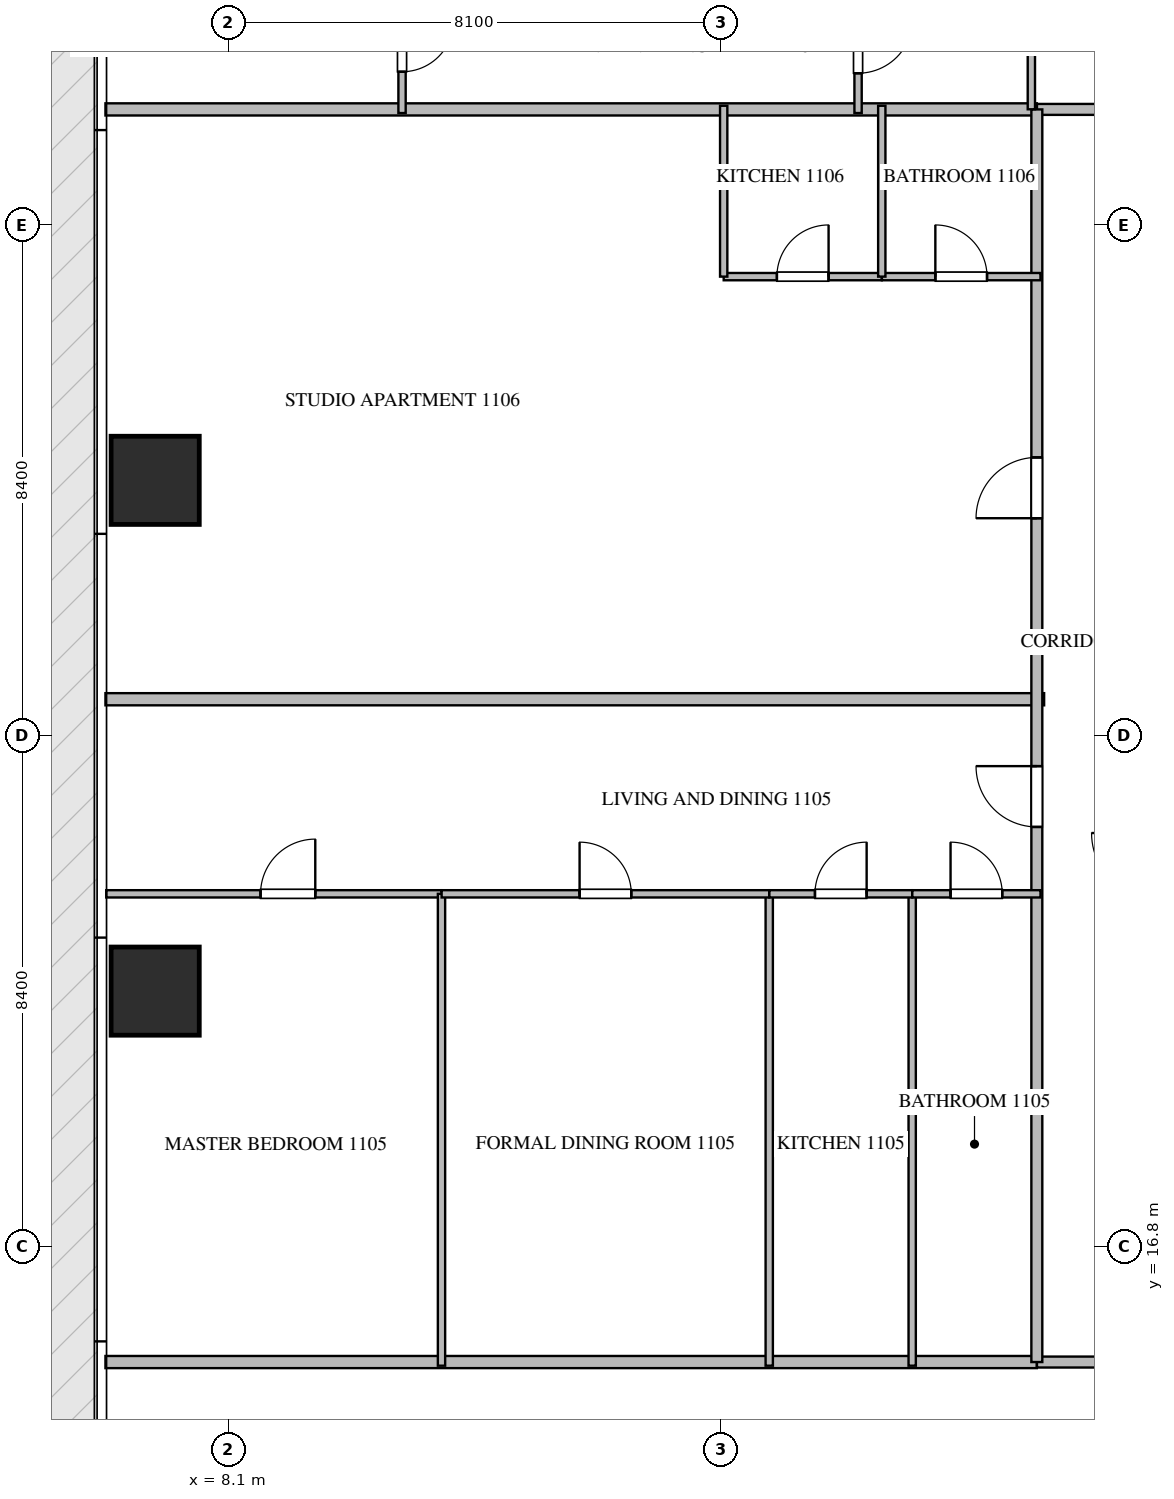
"""IFC4 building model, lengths in metres.
Left out: names, types, materials, properties, quantities, classifications, styles, units other than length and angle.
Written with IfcOpenShell. Run it as: python <this file> out.ifc"""

import sys

from ifc_helpers import new_model, si_unit, direction, frame, frame_2d, origin, origin_2d, place, context, subcontext, project, spatial, rectangle, extrude, source, transform, mapped, element, fill, save


model = new_model("IFC4")
c1 = context("Model", 3, precision=1e-05, world=origin(), true_north=direction((0.0, 1.0)))
c2 = subcontext(c1, "Body", "Model", "MODEL_VIEW")
j1 = project(units=[si_unit("LENGTHUNIT", "METRE"), si_unit("PLANEANGLEUNIT", "RADIAN")], contexts=[c1])
p1 = place(None, origin())
s1 = spatial("IfcSite", under=j1, at=p1, CompositionType="ELEMENT")
p2 = place(p1, origin())
s2 = spatial("IfcBuilding", under=s1, at=p2, CompositionType="ELEMENT")
p3 = place(p2, frame((0.0, 0.0, 49.2)))
s3 = spatial("IfcBuildingStorey", under=s2, at=p3, CompositionType="ELEMENT", Elevation=49.2)
m1 = source(origin(), c2, "Body", "SweptSolid", [
    extrude(rectangle(XDim=1.45, YDim=1.45, at=origin_2d()), origin(), (0.0, 0.0, 1.0), 3.75),
])
for number, where, z_axis, x_axis in (
    (1, (6.9, 21.0, -0.26), (0.0, 0.0, 1.0), (1.0, 0.0, 0.0)),
    (2, (6.9, 29.4, -0.26), (0.0, 0.0, 1.0), (1.0, 0.0, 0.0)),
):
    element("IfcColumn", number, at=place(p3, frame(where, z_axis=z_axis, x_axis=x_axis)), inside=s3, PredefinedType="COLUMN", context=c2, shape_type="MappedRepresentation", body=[
        mapped(m1, transform((0.0, 0.0, 0.0), scale=1.0)),
    ])
p4 = place(p3, frame((6.082, 25.8, 0.0), z_axis=(0.0, 0.0, 1.0), x_axis=(1.0, 0.0, 0.0)))
e3 = element("IfcWall", 3, at=p4, inside=s3, PredefinedType="PARTITIONING", context=c2, shape_type="SweptSolid", body=[
    extrude(rectangle(XDim=15.438, YDim=0.2, at=frame_2d((7.719, 0.0))), origin(), (0.0, 0.0, 1.0), 3.49),
])
for number, where, z_axis, x_axis in (
    (4, (6.082, 14.9, 0.0), (0.0, 0.0, 1.0), (1.0, 0.0, 0.0)),
    (5, (6.082, 35.5, 0.0), (0.0, 0.0, 1.0), (1.0, 0.0, 0.0)),
):
    element("IfcWall", number, at=place(p3, frame(where, z_axis=z_axis, x_axis=x_axis)), inside=s3, PredefinedType="PARTITIONING", context=c2, shape_type="SweptSolid", body=[
        extrude(rectangle(XDim=15.318, YDim=0.2, at=frame_2d((7.659, 0.0))), origin(), (0.0, 0.0, 1.0), 3.49),
    ])
p5 = place(p3, frame((21.402, 14.9, 0.0), z_axis=(0.0, 0.0, 1.0), x_axis=(1.0, 0.0, 0.0)))
e6 = element("IfcWall", 6, at=p5, inside=s3, PredefinedType="PARTITIONING", context=c2, shape_type="SweptSolid", body=[
    extrude(rectangle(XDim=21.996, YDim=0.18, at=frame_2d((10.998, 0.0))), origin(), (0.0, 0.0, 1.0), 3.49),
])
p6 = place(p5, frame((15.222, 0.0, 0.0)))
e7 = element("IfcOpeningElement", 7, at=p6, cuts=e6, PredefinedType="OPENING", context=c2, shape_type="SweptSolid", body=[
    extrude(rectangle(XDim=1.0, YDim=2.15, at=frame_2d((0.5, 1.075))), frame((0.0, 0.1, 0.0), z_axis=(0.0, -1.0, 0.0), x_axis=(1.0, 0.0, 0.0)), (0.0, 0.0, 1.0), 0.2),
])
p7 = place(p3, frame((21.402, 35.5, 0.0), z_axis=(0.0, 0.0, 1.0), x_axis=(1.0, 0.0, 0.0)))
e8 = element("IfcWall", 8, at=p7, inside=s3, PredefinedType="PARTITIONING", context=c2, shape_type="SweptSolid", body=[
    extrude(rectangle(XDim=21.996, YDim=0.18, at=frame_2d((10.998, 0.0))), origin(), (0.0, 0.0, 1.0), 3.49),
])
p8 = place(p7, frame((2.1, 0.0, 0.0)))
e9 = element("IfcOpeningElement", 9, at=p8, cuts=e8, PredefinedType="OPENING", context=c2, shape_type="SweptSolid", body=[
    extrude(rectangle(XDim=1.0, YDim=2.15, at=frame_2d((0.5, 1.075))), frame((0.0, 0.1, 0.0), z_axis=(0.0, -1.0, 0.0), x_axis=(1.0, 0.0, 0.0)), (0.0, 0.0, 1.0), 0.2),
])
p9 = place(p7, frame((14.214, 0.0, 0.0)))
e10 = element("IfcOpeningElement", 10, at=p9, cuts=e8, PredefinedType="OPENING", context=c2, shape_type="SweptSolid", body=[
    extrude(rectangle(XDim=1.0, YDim=2.15, at=frame_2d((0.5, 1.075))), frame((0.0, 0.1, 0.0), z_axis=(0.0, -1.0, 0.0), x_axis=(1.0, 0.0, 0.0)), (0.0, 0.0, 1.0), 0.2),
])
p10 = place(p7, frame((18.896, 0.0, 0.0)))
e11 = element("IfcOpeningElement", 11, at=p10, cuts=e8, PredefinedType="OPENING", context=c2, shape_type="SweptSolid", body=[
    extrude(rectangle(XDim=1.0, YDim=2.15, at=frame_2d((0.5, 1.075))), frame((0.0, 0.1, 0.0), z_axis=(0.0, -1.0, 0.0), x_axis=(1.0, 0.0, 0.0)), (0.0, 0.0, 1.0), 0.2),
])
p11 = place(p3, frame((21.4, 14.9, 0.0), z_axis=(0.0, 0.0, 1.0), x_axis=(0.0, 1.0, 0.0)))
e12 = element("IfcWall", 12, at=p11, inside=s3, PredefinedType="PARTITIONING", context=c2, shape_type="SweptSolid", body=[
    extrude(rectangle(XDim=20.6, YDim=0.18, at=frame_2d((10.3, 0.0))), origin(), (0.0, 0.0, 1.0), 3.49),
])
p12 = place(p11, frame((8.8, 0.0, 0.0)))
e13 = element("IfcOpeningElement", 13, at=p12, cuts=e12, PredefinedType="OPENING", context=c2, shape_type="SweptSolid", body=[
    extrude(rectangle(XDim=1.0, YDim=2.15, at=frame_2d((0.5, 1.075))), frame((0.0, 0.1, 0.0), z_axis=(0.0, -1.0, 0.0), x_axis=(1.0, 0.0, 0.0)), (0.0, 0.0, 1.0), 0.2),
])
p13 = place(p11, frame((13.877, 0.0, 0.0)))
e14 = element("IfcOpeningElement", 14, at=p13, cuts=e12, PredefinedType="OPENING", context=c2, shape_type="SweptSolid", body=[
    extrude(rectangle(XDim=1.0, YDim=2.15, at=frame_2d((0.5, 1.075))), frame((0.0, 0.1, 0.0), z_axis=(0.0, -1.0, 0.0), x_axis=(1.0, 0.0, 0.0)), (0.0, 0.0, 1.0), 0.2),
])
p14 = place(p3, frame((21.31, 38.25, 0.0), z_axis=(0.0, 0.0, 1.0), x_axis=(0.0, -1.0, 0.0)))
e15 = element("IfcWall", 15, at=p14, inside=s3, PredefinedType="PARTITIONING", context=c2, shape_type="SweptSolid", body=[
    extrude(rectangle(XDim=2.748, YDim=0.12, at=frame_2d((1.374, 0.0))), origin(), (0.0, 0.0, 1.0), 3.49),
])
p15 = place(p3, frame((18.46, 37.65, 0.0), z_axis=(0.0, 0.0, 1.0), x_axis=(0.0, -1.0, 0.0)))
e16 = element("IfcWall", 16, at=p15, inside=s3, PredefinedType="PARTITIONING", context=c2, shape_type="SweptSolid", body=[
    extrude(rectangle(XDim=2.21, YDim=0.12, at=frame_2d((1.105, 0.0))), origin(), (0.0, 0.0, 1.0), 3.49),
])
p16 = place(p15, frame((0.655, 0.0, 0.0)))
e17 = element("IfcOpeningElement", 17, at=p16, cuts=e16, PredefinedType="OPENING", context=c2, shape_type="SweptSolid", body=[
    extrude(rectangle(XDim=0.9, YDim=2.1, at=frame_2d((0.45, 1.05))), frame((0.0, 0.07, 0.0), z_axis=(0.0, -1.0, 0.0), x_axis=(1.0, 0.0, 0.0)), (0.0, 0.0, 1.0), 0.14),
])
p17 = place(p3, frame((10.96, 37.648, 0.0), z_axis=(0.0, 0.0, 1.0), x_axis=(0.0, -1.0, 0.0)))
e18 = element("IfcWall", 18, at=p17, inside=s3, PredefinedType="PARTITIONING", context=c2, shape_type="SweptSolid", body=[
    extrude(rectangle(XDim=2.208, YDim=0.12, at=frame_2d((1.104, 0.0))), origin(), (0.0, 0.0, 1.0), 3.49),
])
p18 = place(p17, frame((0.679, 0.0, 0.0)))
e19 = element("IfcOpeningElement", 19, at=p18, cuts=e18, PredefinedType="OPENING", context=c2, shape_type="SweptSolid", body=[
    extrude(rectangle(XDim=0.85, YDim=2.1, at=frame_2d((0.425, 1.05))), frame((0.0, 0.07, 0.0), z_axis=(0.0, -1.0, 0.0), x_axis=(1.0, 0.0, 0.0)), (0.0, 0.0, 1.0), 0.14),
])
p19 = place(p3, frame((6.095, 22.6, 0.0), z_axis=(0.0, 0.0, 1.0), x_axis=(1.0, 0.0, 0.0)))
e20 = element("IfcWall", 20, at=p19, inside=s3, PredefinedType="PARTITIONING", context=c2, shape_type="SweptSolid", body=[
    extrude(rectangle(XDim=5.514, YDim=0.12, at=frame_2d((2.757, 0.0))), origin(), (0.0, 0.0, 1.0), 3.49),
])
p20 = place(p19, frame((2.538, 0.0, 0.0)))
e21 = element("IfcOpeningElement", 21, at=p20, cuts=e20, PredefinedType="OPENING", context=c2, shape_type="SweptSolid", body=[
    extrude(rectangle(XDim=0.9, YDim=2.1, at=frame_2d((0.45, 1.05))), frame((0.0, 0.07, 0.0), z_axis=(0.0, -1.0, 0.0), x_axis=(1.0, 0.0, 0.0)), (0.0, 0.0, 1.0), 0.14),
])
for number, where, z_axis, x_axis in (
    (22, (11.609, 14.84, 0.0), (0.0, 0.0, 1.0), (0.0, 1.0, 0.0)),
    (23, (16.999, 14.84, 0.0), (0.0, 0.0, 1.0), (0.0, 1.0, 0.0)),
    (24, (19.35, 14.84, 0.0), (0.0, 0.0, 1.0), (0.0, 1.0, 0.0)),
):
    element("IfcWall", number, at=place(p3, frame(where, z_axis=z_axis, x_axis=x_axis)), inside=s3, PredefinedType="PARTITIONING", context=c2, shape_type="SweptSolid", body=[
        extrude(rectangle(XDim=7.76, YDim=0.12, at=frame_2d((3.88, 0.0))), origin(), (0.0, 0.0, 1.0), 3.49),
    ])
p21 = place(p3, frame((11.611, 22.6, 0.0), z_axis=(0.0, 0.0, 1.0), x_axis=(1.0, 0.0, 0.0)))
e25 = element("IfcWall", 25, at=p21, inside=s3, PredefinedType="PARTITIONING", context=c2, shape_type="SweptSolid", body=[
    extrude(rectangle(XDim=5.388, YDim=0.12, at=frame_2d((2.694, 0.0))), origin(), (0.0, 0.0, 1.0), 3.49),
])
p22 = place(p21, frame((2.269, 0.0, 0.0)))
e26 = element("IfcOpeningElement", 26, at=p22, cuts=e25, PredefinedType="OPENING", context=c2, shape_type="SweptSolid", body=[
    extrude(rectangle(XDim=0.85, YDim=2.1, at=frame_2d((0.425, 1.05))), frame((0.0, 0.07, 0.0), z_axis=(0.0, -1.0, 0.0), x_axis=(1.0, 0.0, 0.0)), (0.0, 0.0, 1.0), 0.14),
])
p23 = place(p3, frame((17.001, 22.6, 0.0), z_axis=(0.0, 0.0, 1.0), x_axis=(1.0, 0.0, 0.0)))
e27 = element("IfcWall", 27, at=p23, inside=s3, PredefinedType="PARTITIONING", context=c2, shape_type="SweptSolid", body=[
    extrude(rectangle(XDim=2.349, YDim=0.12, at=frame_2d((1.175, 0.0))), origin(), (0.0, 0.0, 1.0), 3.49),
])
p24 = place(p23, frame((0.75, 0.0, 0.0)))
e28 = element("IfcOpeningElement", 28, at=p24, cuts=e27, PredefinedType="OPENING", context=c2, shape_type="SweptSolid", body=[
    extrude(rectangle(XDim=0.85, YDim=2.1, at=frame_2d((0.425, 1.05))), frame((0.0, 0.07, 0.0), z_axis=(0.0, -1.0, 0.0), x_axis=(1.0, 0.0, 0.0)), (0.0, 0.0, 1.0), 0.14),
])
p25 = place(p3, frame((19.352, 22.6, 0.0), z_axis=(0.0, 0.0, 1.0), x_axis=(1.0, 0.0, 0.0)))
e29 = element("IfcWall", 29, at=p25, inside=s3, PredefinedType="PARTITIONING", context=c2, shape_type="SweptSolid", body=[
    extrude(rectangle(XDim=2.108, YDim=0.12, at=frame_2d((1.054, 0.0))), origin(), (0.0, 0.0, 1.0), 3.49),
])
p26 = place(p25, frame((0.629, 0.0, 0.0)))
e30 = element("IfcOpeningElement", 30, at=p26, cuts=e29, PredefinedType="OPENING", context=c2, shape_type="SweptSolid", body=[
    extrude(rectangle(XDim=0.85, YDim=2.1, at=frame_2d((0.425, 1.05))), frame((0.0, 0.07, 0.0), z_axis=(0.0, -1.0, 0.0), x_axis=(1.0, 0.0, 0.0)), (0.0, 0.0, 1.0), 0.14),
])
p27 = place(p3, frame((16.25, 32.75, 0.0), z_axis=(0.0, 0.0, 1.0), x_axis=(1.0, 0.0, 0.0)))
e31 = element("IfcWall", 31, at=p27, inside=s3, PredefinedType="PARTITIONING", context=c2, shape_type="SweptSolid", body=[
    extrude(rectangle(XDim=2.6, YDim=0.12, at=frame_2d((1.3, 0.0))), origin(), (0.0, 0.0, 1.0), 3.49),
])
p28 = place(p27, frame((0.875, 0.0, 0.0)))
e32 = element("IfcOpeningElement", 32, at=p28, cuts=e31, PredefinedType="OPENING", context=c2, shape_type="SweptSolid", body=[
    extrude(rectangle(XDim=0.85, YDim=2.1, at=frame_2d((0.425, 1.05))), frame((0.0, 0.07, 0.0), z_axis=(0.0, -1.0, 0.0), x_axis=(1.0, 0.0, 0.0)), (0.0, 0.0, 1.0), 0.14),
])
p29 = place(p3, frame((18.852, 32.75, 0.0), z_axis=(0.0, 0.0, 1.0), x_axis=(1.0, 0.0, 0.0)))
e33 = element("IfcWall", 33, at=p29, inside=s3, PredefinedType="PARTITIONING", context=c2, shape_type="SweptSolid", body=[
    extrude(rectangle(XDim=2.608, YDim=0.12, at=frame_2d((1.304, 0.0))), origin(), (0.0, 0.0, 1.0), 3.49),
])
p30 = place(p29, frame((0.879, 0.0, 0.0)))
e34 = element("IfcOpeningElement", 34, at=p30, cuts=e33, PredefinedType="OPENING", context=c2, shape_type="SweptSolid", body=[
    extrude(rectangle(XDim=0.85, YDim=2.1, at=frame_2d((0.425, 1.05))), frame((0.0, 0.07, 0.0), z_axis=(0.0, -1.0, 0.0), x_axis=(1.0, 0.0, 0.0)), (0.0, 0.0, 1.0), 0.14),
])
for number, where, z_axis, x_axis in (
    (35, (18.85, 32.75, 0.0), (0.0, 0.0, 1.0), (0.0, 1.0, 0.0)),
    (36, (16.25, 32.75, 0.0), (0.0, 0.0, 1.0), (0.0, 1.0, 0.0)),
):
    element("IfcWall", number, at=place(p3, frame(where, z_axis=z_axis, x_axis=x_axis)), inside=s3, PredefinedType="PARTITIONING", context=c2, shape_type="SweptSolid", body=[
        extrude(rectangle(XDim=2.81, YDim=0.12, at=frame_2d((1.405, 0.0))), origin(), (0.0, 0.0, 1.0), 3.49),
    ])
m2 = source(origin(), c2, "Body", "SweptSolid", [
    extrude(rectangle(XDim=1.0, YDim=2.15, at=frame_2d((0.5, 1.075))), frame((0.0, 0.025, 0.0), z_axis=(0.0, -1.0, 0.0), x_axis=(1.0, 0.0, 0.0)), (0.0, 0.0, 1.0), 0.05),
])
p31 = place(p12, origin())
e37 = element("IfcDoor", 37, at=p31, inside=s3, OperationType="SINGLE_SWING_RIGHT", PredefinedType="DOOR", context=c2, shape_type="MappedRepresentation", body=[
    mapped(m2, transform((0.0, 0.0, 0.0), scale=1.0)),
])
fill(e13, e37)
p32 = place(p13, origin())
e38 = element("IfcDoor", 38, at=p32, inside=s3, OperationType="SINGLE_SWING_LEFT", PredefinedType="DOOR", context=c2, shape_type="MappedRepresentation", body=[
    mapped(m2, transform((0.0, 0.0, 0.0), scale=1.0)),
])
fill(e14, e38)
m3 = source(origin(), c2, "Body", "SweptSolid", [
    extrude(rectangle(XDim=0.9, YDim=2.1, at=frame_2d((0.45, 1.05))), frame((0.0, 0.025, 0.0), z_axis=(0.0, -1.0, 0.0), x_axis=(1.0, 0.0, 0.0)), (0.0, 0.0, 1.0), 0.05),
])
p33 = place(p16, origin())
e39 = element("IfcDoor", 39, at=p33, inside=s3, OperationType="SINGLE_SWING_LEFT", PredefinedType="DOOR", context=c2, shape_type="MappedRepresentation", body=[
    mapped(m3, transform((0.0, 0.0, 0.0), scale=1.0)),
])
fill(e17, e39)
m4 = source(origin(), c2, "Body", "SweptSolid", [
    extrude(rectangle(XDim=0.85, YDim=2.1, at=frame_2d((0.425, 1.05))), frame((0.0, 0.025, 0.0), z_axis=(0.0, -1.0, 0.0), x_axis=(1.0, 0.0, 0.0)), (0.0, 0.0, 1.0), 0.05),
])
p34 = place(p18, origin())
e40 = element("IfcDoor", 40, at=p34, inside=s3, OperationType="SINGLE_SWING_LEFT", PredefinedType="DOOR", context=c2, shape_type="MappedRepresentation", body=[
    mapped(m4, transform((0.0, 0.0, 0.0), scale=1.0)),
])
fill(e19, e40)
p35 = place(p20, origin())
e41 = element("IfcDoor", 41, at=p35, inside=s3, OperationType="SINGLE_SWING_RIGHT", PredefinedType="DOOR", context=c2, shape_type="MappedRepresentation", body=[
    mapped(m3, transform((0.0, 0.0, 0.0), scale=1.0)),
])
fill(e21, e41)
p36 = place(p22, origin())
e42 = element("IfcDoor", 42, at=p36, inside=s3, OperationType="SINGLE_SWING_LEFT", PredefinedType="DOOR", context=c2, shape_type="MappedRepresentation", body=[
    mapped(m4, transform((0.0, 0.0, 0.0), scale=1.0)),
])
fill(e26, e42)
p37 = place(p24, origin())
e43 = element("IfcDoor", 43, at=p37, inside=s3, OperationType="SINGLE_SWING_RIGHT", PredefinedType="DOOR", context=c2, shape_type="MappedRepresentation", body=[
    mapped(m4, transform((0.0, 0.0, 0.0), scale=1.0)),
])
fill(e28, e43)
p38 = place(p26, origin())
e44 = element("IfcDoor", 44, at=p38, inside=s3, OperationType="SINGLE_SWING_LEFT", PredefinedType="DOOR", context=c2, shape_type="MappedRepresentation", body=[
    mapped(m4, transform((0.0, 0.0, 0.0), scale=1.0)),
])
fill(e30, e44)
p39 = place(p28, origin())
e45 = element("IfcDoor", 45, at=p39, inside=s3, OperationType="SINGLE_SWING_RIGHT", PredefinedType="DOOR", context=c2, shape_type="MappedRepresentation", body=[
    mapped(m4, transform((0.0, 0.0, 0.0), scale=1.0)),
])
fill(e32, e45)
p40 = place(p30, origin())
e46 = element("IfcDoor", 46, at=p40, inside=s3, OperationType="SINGLE_SWING_LEFT", PredefinedType="DOOR", context=c2, shape_type="MappedRepresentation", body=[
    mapped(m4, transform((0.0, 0.0, 0.0), scale=1.0)),
])
fill(e34, e46)
save(model, sys.argv[1])
